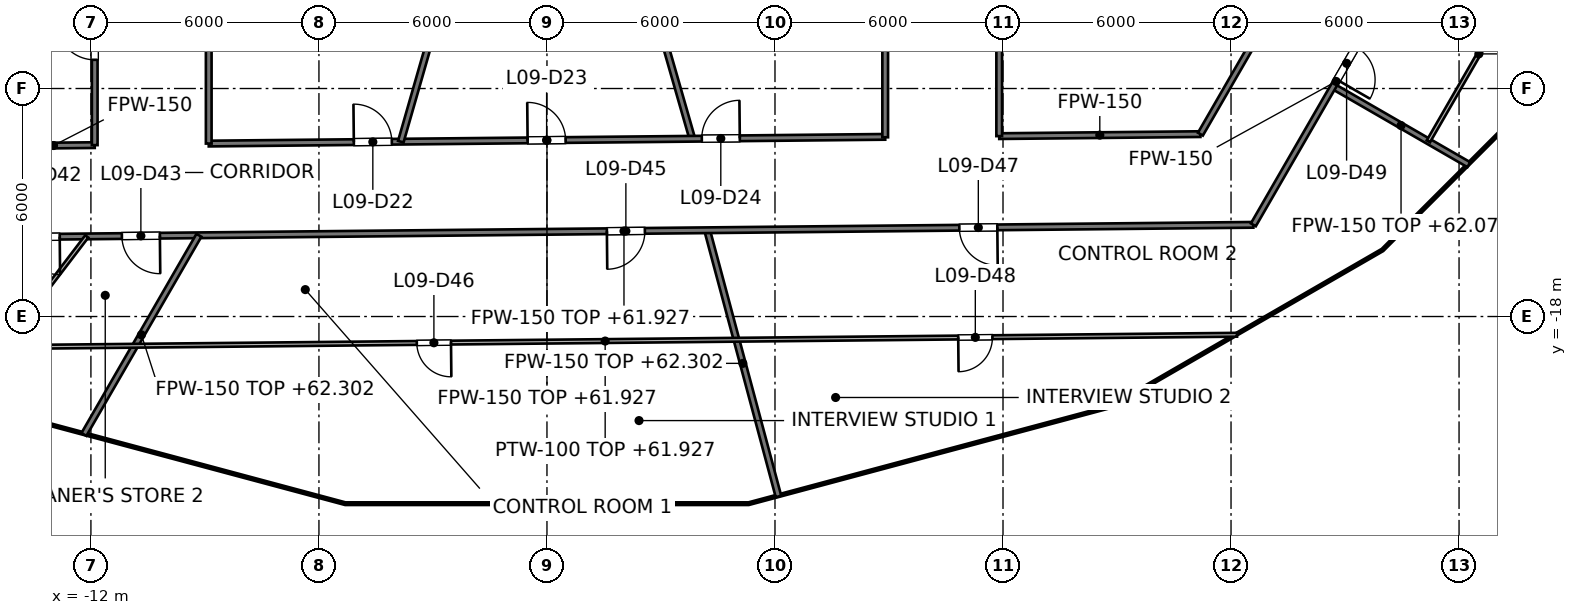
"""IFC4 building model, lengths in metres.
Left out: names, types, materials, properties, quantities, classifications, styles, units other than length and angle.
Written with IfcOpenShell. Run it as: python <this file> out.ifc"""

import sys

from ifc_helpers import new_model, si_unit, direction, frame, frame_2d, origin, place, context, subcontext, project, spatial, rectangle, extrude, element, fill, save


model = new_model("IFC4")
c1 = context("Model", 3, precision=1e-05, world=origin(), true_north=direction((0.0, 1.0)))
c2 = subcontext(c1, "Body", "Model", "MODEL_VIEW")
j1 = project(units=[si_unit("LENGTHUNIT", "METRE"), si_unit("PLANEANGLEUNIT", "RADIAN")], contexts=[c1])
p1 = place(None, origin())
s1 = spatial("IfcSite", under=j1, at=p1, CompositionType="ELEMENT")
p2 = place(p1, origin())
s2 = spatial("IfcBuilding", under=s1, at=p2, CompositionType="ELEMENT")
p3 = place(p2, frame((0.0, 0.0, 58.8)))
s3 = spatial("IfcBuildingStorey", under=s2, at=p3, CompositionType="ELEMENT", Elevation=58.8)
p4 = place(p3, frame((4.215, -15.73, 0.0), z_axis=(0.0, 0.0, 1.0), x_axis=(0.25877927493, -0.965936481797, 0.0)))
e1 = element("IfcWall", 1, at=p4, inside=s3, PredefinedType="PARTITIONING", context=c2, shape_type="SweptSolid", body=[
    extrude(rectangle(XDim=7.252, YDim=0.15, at=frame_2d((3.626, 0.0))), origin(), (0.0, 0.0, 1.0), 3.502),
])
p5 = place(p3, frame((2.296, -8.0, 0.0), z_axis=(0.0, 0.0, 1.0), x_axis=(0.275935525478, -0.961176147113, 0.0)))
e2 = element("IfcWall", 2, at=p5, inside=s3, PredefinedType="PARTITIONING", context=c2, shape_type="SweptSolid", body=[
    extrude(rectangle(XDim=5.548, YDim=0.15, at=frame_2d((2.774, 0.0))), origin(), (0.0, 0.0, 1.0), 4.05),
])
p6 = place(p3, frame((20.69, -11.945, 0.0), z_axis=(0.0, 0.0, 1.0), x_axis=(0.866053314856, -0.49995165349, 0.0)))
e3 = element("IfcWall", 3, at=p6, inside=s3, PredefinedType="PARTITIONING", context=c2, shape_type="SweptSolid", body=[
    extrude(rectangle(XDim=4.119, YDim=0.15, at=frame_2d((2.059, 0.0))), origin(), (0.0, 0.0, 1.0), 3.276),
])
p7 = place(p3, frame((-14.534, -15.916, 0.0), z_axis=(0.0, 0.0, 1.0), x_axis=(0.999950637767, 0.009935896005, 0.0)))
e4 = element("IfcWall", 4, at=p7, inside=s3, PredefinedType="PARTITIONING", context=c2, shape_type="SweptSolid", body=[
    extrude(rectangle(XDim=33.123, YDim=0.15, at=frame_2d((16.561, 0.0))), origin(), (0.0, 0.0, 1.0), 3.127),
])
p8 = place(p7, frame((0.713, 0.0, 0.0)))
e5 = element("IfcOpeningElement", 5, at=p8, cuts=e4, PredefinedType="OPENING", context=c2, shape_type="SweptSolid", body=[
    extrude(rectangle(XDim=1.0, YDim=2.1, at=frame_2d((0.5, 1.05))), frame((0.0, 0.075, 0.0), z_axis=(0.0, -1.0, 0.0), x_axis=(1.0, 0.0, 0.0)), (0.0, 0.0, 1.0), 0.15),
])
p9 = place(p7, frame((3.349, 0.0, 0.0)))
e6 = element("IfcOpeningElement", 6, at=p9, cuts=e4, PredefinedType="OPENING", context=c2, shape_type="SweptSolid", body=[
    extrude(rectangle(XDim=1.0, YDim=2.1, at=frame_2d((0.5, 1.05))), frame((0.0, 0.075, 0.0), z_axis=(0.0, -1.0, 0.0), x_axis=(1.0, 0.0, 0.0)), (0.0, 0.0, 1.0), 0.15),
])
p10 = place(p7, frame((16.111, 0.0, 0.0)))
e7 = element("IfcOpeningElement", 7, at=p10, cuts=e4, PredefinedType="OPENING", context=c2, shape_type="SweptSolid", body=[
    extrude(rectangle(XDim=1.0, YDim=2.1, at=frame_2d((0.5, 1.05))), frame((0.0, 0.075, 0.0), z_axis=(0.0, -1.0, 0.0), x_axis=(1.0, 0.0, 0.0)), (0.0, 0.0, 1.0), 0.15),
])
p11 = place(p7, frame((25.386, 0.0, 0.0)))
e8 = element("IfcOpeningElement", 8, at=p11, cuts=e4, PredefinedType="OPENING", context=c2, shape_type="SweptSolid", body=[
    extrude(rectangle(XDim=1.0, YDim=2.1, at=frame_2d((0.5, 1.05))), frame((0.0, 0.075, 0.0), z_axis=(0.0, -1.0, 0.0), x_axis=(1.0, 0.0, 0.0)), (0.0, 0.0, 1.0), 0.15),
])
p12 = place(p3, frame((-14.068, -13.511, 0.0), z_axis=(0.0, 0.0, 1.0), x_axis=(0.999950911515, 0.009908307647, 0.0)))
e9 = element("IfcWall", 9, at=p12, inside=s3, PredefinedType="PARTITIONING", context=c2, shape_type="SweptSolid", body=[
    extrude(rectangle(XDim=2.168, YDim=0.15, at=frame_2d((1.084, 0.0))), origin(), (0.0, 0.0, 1.0), 3.195),
])
p13 = place(p3, frame((-8.9, -13.449, 0.0), z_axis=(0.0, 0.0, 1.0), x_axis=(0.999950697987, 0.009929833562, 0.0)))
e10 = element("IfcWall", 10, at=p13, inside=s3, PredefinedType="PARTITIONING", context=c2, shape_type="SweptSolid", body=[
    extrude(rectangle(XDim=17.801, YDim=0.15, at=frame_2d((8.9, 0.0))), origin(), (0.0, 0.0, 1.0), 3.127),
])
p14 = place(p13, frame((3.818, 0.0, 0.0)))
e11 = element("IfcOpeningElement", 11, at=p14, cuts=e10, PredefinedType="OPENING", context=c2, shape_type="SweptSolid", body=[
    extrude(rectangle(XDim=1.0, YDim=2.1, at=frame_2d((0.5, 1.05))), frame((0.0, 0.075, 0.0), z_axis=(0.0, -1.0, 0.0), x_axis=(1.0, 0.0, 0.0)), (0.0, 0.0, 1.0), 0.15),
])
p15 = place(p13, frame((8.391, 0.0, 0.0)))
e12 = element("IfcOpeningElement", 12, at=p15, cuts=e10, PredefinedType="OPENING", context=c2, shape_type="SweptSolid", body=[
    extrude(rectangle(XDim=1.0, YDim=2.1, at=frame_2d((0.5, 1.05))), frame((0.0, 0.075, 0.0), z_axis=(0.0, -1.0, 0.0), x_axis=(1.0, 0.0, 0.0)), (0.0, 0.0, 1.0), 0.15),
])
p16 = place(p13, frame((12.975, 0.0, 0.0)))
e13 = element("IfcOpeningElement", 13, at=p16, cuts=e10, PredefinedType="OPENING", context=c2, shape_type="SweptSolid", body=[
    extrude(rectangle(XDim=1.0, YDim=2.1, at=frame_2d((0.5, 1.05))), frame((0.0, 0.075, 0.0), z_axis=(0.0, -1.0, 0.0), x_axis=(1.0, 0.0, 0.0)), (0.0, 0.0, 1.0), 0.15),
])
p17 = place(p3, frame((11.9, -13.253, 0.0), z_axis=(0.0, 0.0, 1.0), x_axis=(0.999950853109, 0.009914200296, 0.0)))
e14 = element("IfcWall", 14, at=p17, inside=s3, PredefinedType="PARTITIONING", context=c2, shape_type="SweptSolid", body=[
    extrude(rectangle(XDim=5.294, YDim=0.15, at=frame_2d((2.647, 0.0))), origin(), (0.0, 0.0, 1.0), 3.195),
])
p18 = place(p3, frame((18.587, -15.587, 0.0), z_axis=(0.0, 0.0, 1.0), x_axis=(0.500026433136, 0.866010142069, 0.0)))
e15 = element("IfcWall", 15, at=p18, inside=s3, PredefinedType="PARTITIONING", context=c2, shape_type="SweptSolid", body=[
    extrude(rectangle(XDim=8.713, YDim=0.15, at=frame_2d((4.357, 0.0))), origin(), (0.0, 0.0, 1.0), 3.195),
])
p19 = place(p18, frame((4.408, 0.0, 0.0)))
e16 = element("IfcOpeningElement", 16, at=p19, cuts=e15, PredefinedType="OPENING", context=c2, shape_type="SweptSolid", body=[
    extrude(rectangle(XDim=1.0, YDim=2.1, at=frame_2d((0.5, 1.05))), frame((0.0, 0.075, 0.0), z_axis=(0.0, -1.0, 0.0), x_axis=(1.0, 0.0, 0.0)), (0.0, 0.0, 1.0), 0.15),
])
p20 = place(p3, frame((17.194, -13.201, 0.0), z_axis=(0.0, 0.0, 1.0), x_axis=(0.50001062018, 0.866019272134, 0.0)))
e17 = element("IfcWall", 17, at=p20, inside=s3, PredefinedType="PARTITIONING", context=c2, shape_type="SweptSolid", body=[
    extrude(rectangle(XDim=6.674, YDim=0.15, at=frame_2d((3.337, 0.0))), origin(), (0.0, 0.0, 1.0), 3.195),
])
p21 = place(p20, frame((2.833, 0.0, 0.0)))
e18 = element("IfcOpeningElement", 18, at=p21, cuts=e17, PredefinedType="OPENING", context=c2, shape_type="SweptSolid", body=[
    extrude(rectangle(XDim=1.0, YDim=2.1, at=frame_2d((0.5, 1.05))), frame((0.0, 0.075, 0.0), z_axis=(0.0, -1.0, 0.0), x_axis=(1.0, 0.0, 0.0)), (0.0, 0.0, 1.0), 0.15),
])
p22 = place(p3, frame((-12.184, -21.103, 0.0), z_axis=(0.0, 0.0, 1.0), x_axis=(0.500022810783, 0.866012233572, 0.0)))
e19 = element("IfcWall", 19, at=p22, inside=s3, PredefinedType="PARTITIONING", context=c2, shape_type="SweptSolid", body=[
    extrude(rectangle(XDim=6.051, YDim=0.15, at=frame_2d((3.025, 0.0))), origin(), (0.0, 0.0, 1.0), 3.502),
])
p23 = place(p3, frame((-3.846, -13.399, 0.0), z_axis=(0.0, 0.0, 1.0), x_axis=(0.275914969745, 0.961182048038, 0.0)))
e20 = element("IfcWall", 20, at=p23, inside=s3, PredefinedType="PARTITIONING", context=c2, shape_type="SweptSolid", body=[
    extrude(rectangle(XDim=5.617, YDim=0.15, at=frame_2d((2.809, 0.0))), origin(), (0.0, 0.0, 1.0), 4.05),
])
p24 = place(p3, frame((11.9, -13.253, 0.0), z_axis=(0.0, 0.0, 1.0), x_axis=(0.0, 1.0, 0.0)))
e21 = element("IfcWall", 21, at=p24, inside=s3, PredefinedType="PARTITIONING", context=c2, shape_type="SweptSolid", body=[
    extrude(rectangle(XDim=5.253, YDim=0.15, at=frame_2d((2.626, 0.0))), origin(), (0.0, 0.0, 1.0), 3.195),
])
p25 = place(p3, frame((8.9, -13.283, 0.0), z_axis=(0.0, 0.0, 1.0), x_axis=(0.0, 1.0, 0.0)))
e22 = element("IfcWall", 22, at=p25, inside=s3, PredefinedType="PARTITIONING", context=c2, shape_type="SweptSolid", body=[
    extrude(rectangle(XDim=5.283, YDim=0.15, at=frame_2d((2.642, 0.0))), origin(), (0.0, 0.0, 1.0), 3.127),
])
p26 = place(p3, frame((-8.9, -13.449, 0.0), z_axis=(0.0, 0.0, 1.0), x_axis=(0.0, 1.0, 0.0)))
e23 = element("IfcWall", 23, at=p26, inside=s3, PredefinedType="PARTITIONING", context=c2, shape_type="SweptSolid", body=[
    extrude(rectangle(XDim=5.449, YDim=0.15, at=frame_2d((2.725, 0.0))), origin(), (0.0, 0.0, 1.0), 3.127),
])
p27 = place(p3, frame((-11.9, -13.49, 0.0), z_axis=(0.0, 0.0, 1.0), x_axis=(0.0, 1.0, 0.0)))
e24 = element("IfcWall", 24, at=p27, inside=s3, PredefinedType="PARTITIONING", context=c2, shape_type="SweptSolid", body=[
    extrude(rectangle(XDim=5.49, YDim=0.15, at=frame_2d((2.745, 0.0))), origin(), (0.0, 0.0, 1.0), 3.195),
])
p28 = place(p27, frame((2.245, 0.0, 0.0)))
e25 = element("IfcOpeningElement", 25, at=p28, cuts=e24, PredefinedType="OPENING", context=c2, shape_type="SweptSolid", body=[
    extrude(rectangle(XDim=1.0, YDim=2.1, at=frame_2d((0.5, 1.05))), frame((0.0, 0.075, 0.0), z_axis=(0.0, -1.0, 0.0), x_axis=(1.0, 0.0, 0.0)), (0.0, 0.0, 1.0), 0.15),
])
p29 = place(p3, frame((-15.095, -18.812, 0.0), z_axis=(0.0, 0.0, 1.0), x_axis=(0.999950080065, 0.009991865576, 0.0)))
e26 = element("IfcWall", 26, at=p29, inside=s3, PredefinedType="PARTITIONING", context=c2, shape_type="SweptSolid", body=[
    extrude(rectangle(XDim=33.255, YDim=0.1, at=frame_2d((16.627, 0.0))), origin(), (0.0, 0.0, 1.0), 3.127),
])
p30 = place(p29, frame((11.671, 0.0, 0.0)))
e27 = element("IfcOpeningElement", 27, at=p30, cuts=e26, PredefinedType="OPENING", context=c2, shape_type="SweptSolid", body=[
    extrude(rectangle(XDim=0.9, YDim=2.1, at=frame_2d((0.45, 1.05))), frame((0.0, 0.05, 0.0), z_axis=(0.0, -1.0, 0.0), x_axis=(1.0, 0.0, 0.0)), (0.0, 0.0, 1.0), 0.1),
])
p31 = place(p29, frame((25.918, 0.0, 0.0)))
e28 = element("IfcOpeningElement", 28, at=p31, cuts=e26, PredefinedType="OPENING", context=c2, shape_type="SweptSolid", body=[
    extrude(rectangle(XDim=0.9, YDim=2.1, at=frame_2d((0.45, 1.05))), frame((0.0, 0.05, 0.0), z_axis=(0.0, -1.0, 0.0), x_axis=(1.0, 0.0, 0.0)), (0.0, 0.0, 1.0), 0.1),
])
p32 = place(p3, frame((-14.328, -18.804, 0.0), z_axis=(0.0, 0.0, 1.0), x_axis=(0.606117553719, 0.795375075718, 0.0)))
e29 = element("IfcWall", 29, at=p32, inside=s3, PredefinedType="PARTITIONING", context=c2, shape_type="SweptSolid", body=[
    extrude(rectangle(XDim=3.661, YDim=0.1, at=frame_2d((1.831, 0.0))), origin(), (0.0, 0.0, 1.0), 4.05),
])
p33 = place(p3, frame((23.193, -13.39, 0.0), z_axis=(0.0, 0.0, 1.0), x_axis=(0.500018082969, 0.866014963326, 0.0)))
e30 = element("IfcWall", 30, at=p33, inside=s3, PredefinedType="PARTITIONING", context=c2, shape_type="SweptSolid", body=[
    extrude(rectangle(XDim=5.314, YDim=0.1, at=frame_2d((2.657, 0.0))), origin(), (0.0, 0.0, 1.0), 3.276),
])
p34 = place(p14, origin())
e31 = element("IfcDoor", 31, at=p34, inside=s3, OperationType="SINGLE_SWING_LEFT", PredefinedType="DOOR", context=c2, shape_type="SweptSolid", body=[
    extrude(rectangle(XDim=1.0, YDim=2.1, at=frame_2d((0.5, 1.05))), frame((0.0, 0.025, 0.0), z_axis=(0.0, -1.0, 0.0), x_axis=(1.0, 0.0, 0.0)), (0.0, 0.0, 1.0), 0.05),
])
fill(e11, e31)
p35 = place(p15, origin())
e32 = element("IfcDoor", 32, at=p35, inside=s3, OperationType="SINGLE_SWING_LEFT", PredefinedType="DOOR", context=c2, shape_type="SweptSolid", body=[
    extrude(rectangle(XDim=1.0, YDim=2.1, at=frame_2d((0.5, 1.05))), frame((0.0, 0.025, 0.0), z_axis=(0.0, -1.0, 0.0), x_axis=(1.0, 0.0, 0.0)), (0.0, 0.0, 1.0), 0.05),
])
fill(e12, e32)
p36 = place(p16, origin())
e33 = element("IfcDoor", 33, at=p36, inside=s3, OperationType="SINGLE_SWING_RIGHT", PredefinedType="DOOR", context=c2, shape_type="SweptSolid", body=[
    extrude(rectangle(XDim=1.0, YDim=2.1, at=frame_2d((0.5, 1.05))), frame((0.0, 0.025, 0.0), z_axis=(0.0, -1.0, 0.0), x_axis=(1.0, 0.0, 0.0)), (0.0, 0.0, 1.0), 0.05),
])
fill(e13, e33)
p37 = place(p28, origin())
e34 = element("IfcDoor", 34, at=p37, inside=s3, OperationType="SINGLE_SWING_RIGHT", PredefinedType="DOOR", context=c2, shape_type="SweptSolid", body=[
    extrude(rectangle(XDim=1.0, YDim=2.1, at=frame_2d((0.5, 1.05))), frame((0.0, 0.025, 0.0), z_axis=(0.0, -1.0, 0.0), x_axis=(1.0, 0.0, 0.0)), (0.0, 0.0, 1.0), 0.05),
])
fill(e25, e34)
p38 = place(p8, origin())
e35 = element("IfcDoor", 35, at=p38, inside=s3, OperationType="SINGLE_SWING_RIGHT", PredefinedType="DOOR", context=c2, shape_type="SweptSolid", body=[
    extrude(rectangle(XDim=1.0, YDim=2.1, at=frame_2d((0.5, 1.05))), frame((0.0, 0.025, 0.0), z_axis=(0.0, -1.0, 0.0), x_axis=(1.0, 0.0, 0.0)), (0.0, 0.0, 1.0), 0.05),
])
fill(e5, e35)
p39 = place(p9, origin())
e36 = element("IfcDoor", 36, at=p39, inside=s3, OperationType="SINGLE_SWING_RIGHT", PredefinedType="DOOR", context=c2, shape_type="SweptSolid", body=[
    extrude(rectangle(XDim=1.0, YDim=2.1, at=frame_2d((0.5, 1.05))), frame((0.0, 0.025, 0.0), z_axis=(0.0, -1.0, 0.0), x_axis=(1.0, 0.0, 0.0)), (0.0, 0.0, 1.0), 0.05),
])
fill(e6, e36)
p40 = place(p10, origin())
e37 = element("IfcDoor", 37, at=p40, inside=s3, OperationType="SINGLE_SWING_LEFT", PredefinedType="DOOR", context=c2, shape_type="SweptSolid", body=[
    extrude(rectangle(XDim=1.0, YDim=2.1, at=frame_2d((0.5, 1.05))), frame((0.0, 0.025, 0.0), z_axis=(0.0, -1.0, 0.0), x_axis=(1.0, 0.0, 0.0)), (0.0, 0.0, 1.0), 0.05),
])
fill(e7, e37)
p41 = place(p30, origin())
e38 = element("IfcDoor", 38, at=p41, inside=s3, OperationType="SINGLE_SWING_RIGHT", PredefinedType="DOOR", context=c2, shape_type="SweptSolid", body=[
    extrude(rectangle(XDim=0.9, YDim=2.1, at=frame_2d((0.45, 1.05))), frame((0.0, 0.025, 0.0), z_axis=(0.0, -1.0, 0.0), x_axis=(1.0, 0.0, 0.0)), (0.0, 0.0, 1.0), 0.05),
])
fill(e27, e38)
p42 = place(p11, origin())
e39 = element("IfcDoor", 39, at=p42, inside=s3, OperationType="SINGLE_SWING_RIGHT", PredefinedType="DOOR", context=c2, shape_type="SweptSolid", body=[
    extrude(rectangle(XDim=1.0, YDim=2.1, at=frame_2d((0.5, 1.05))), frame((0.0, 0.025, 0.0), z_axis=(0.0, -1.0, 0.0), x_axis=(1.0, 0.0, 0.0)), (0.0, 0.0, 1.0), 0.05),
])
fill(e8, e39)
p43 = place(p31, origin())
e40 = element("IfcDoor", 40, at=p43, inside=s3, OperationType="SINGLE_SWING_LEFT", PredefinedType="DOOR", context=c2, shape_type="SweptSolid", body=[
    extrude(rectangle(XDim=0.9, YDim=2.1, at=frame_2d((0.45, 1.05))), frame((0.0, 0.025, 0.0), z_axis=(0.0, -1.0, 0.0), x_axis=(1.0, 0.0, 0.0)), (0.0, 0.0, 1.0), 0.05),
])
fill(e28, e40)
p44 = place(p19, origin())
e41 = element("IfcDoor", 41, at=p44, inside=s3, OperationType="SINGLE_SWING_LEFT", PredefinedType="DOOR", context=c2, shape_type="SweptSolid", body=[
    extrude(rectangle(XDim=1.0, YDim=2.1, at=frame_2d((0.5, 1.05))), frame((0.0, 0.025, 0.0), z_axis=(0.0, -1.0, 0.0), x_axis=(1.0, 0.0, 0.0)), (0.0, 0.0, 1.0), 0.05),
])
fill(e16, e41)
save(model, sys.argv[1])
